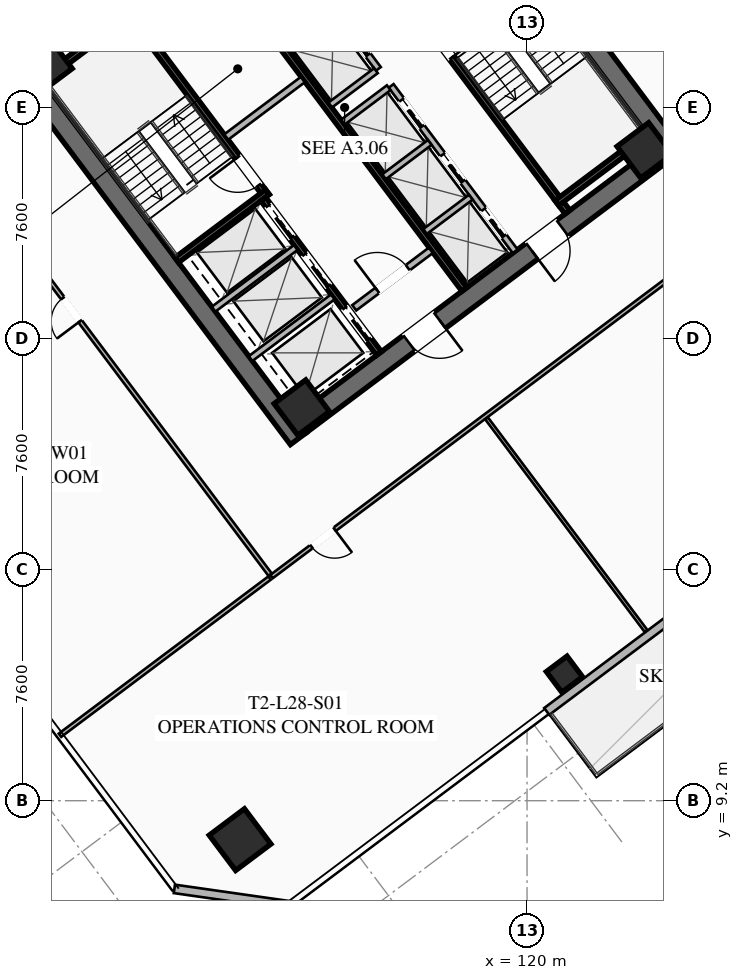
"""IFC4 building model, lengths in metres.
Left out: names, types, materials, properties, quantities, classifications, styles, units other than length and angle.
Written with IfcOpenShell. Run it as: python <this file> out.ifc"""

import sys

from ifc_helpers import new_model, si_unit, direction, frame, frame_2d, origin, origin_2d, place, context, subcontext, project, spatial, rectangle, hollow_rectangle, extrude, element, fill, save


model = new_model("IFC4")
c1 = context("Model", 3, precision=1e-05, world=origin(), true_north=direction((0.0, 1.0)))
c2 = subcontext(c1, "Body", "Model", "MODEL_VIEW")
j1 = project(units=[si_unit("LENGTHUNIT", "METRE"), si_unit("PLANEANGLEUNIT", "RADIAN")], contexts=[c1])
p1 = place(None, origin())
s1 = spatial("IfcSite", under=j1, at=p1, CompositionType="ELEMENT")
p2 = place(p1, origin())
s2 = spatial("IfcBuilding", under=s1, at=p2, CompositionType="ELEMENT")
p3 = place(p2, frame((0.0, 0.0, 106.25)))
s3 = spatial("IfcBuildingStorey", under=s2, at=p3, CompositionType="ELEMENT", Elevation=106.25)
for number, where, z_axis, x_axis in (
    (1, (112.476, 21.107, 0.0), (0.0, 0.0, 1.0), (-0.6, 0.8, 0.0)),
    (2, (115.524, 42.893, 0.0), (0.0, 0.0, 1.0), (0.6, -0.8, 0.0)),
):
    element("IfcWall", number, at=place(p3, frame(where, z_axis=z_axis, x_axis=x_axis)), inside=s3, PredefinedType="SHEAR", context=c2, shape_type="SweptSolid", body=[
        extrude(rectangle(XDim=15.6, YDim=0.65, at=frame_2d((7.8, 0.0))), origin(), (0.0, 0.0, 1.0), 3.55),
    ])
p4 = place(p3, frame((124.429, 30.478, 0.0), z_axis=(0.0, 0.0, 1.0), x_axis=(-0.799998028465, -0.600002628705, 0.0)))
e3 = element("IfcWall", 3, at=p4, inside=s3, PredefinedType="SHEAR", context=c2, shape_type="SweptSolid", body=[
    extrude(rectangle(XDim=14.86, YDim=0.65, at=frame_2d((7.43, 0.0))), origin(), (0.0, 0.0, 1.0), 3.55),
])
p5 = place(p4, frame((9.13, 0.0, 0.0)))
e4 = element("IfcOpeningElement", 4, at=p5, cuts=e3, PredefinedType="OPENING", context=c2, shape_type="SweptSolid", body=[
    extrude(rectangle(XDim=1.25, YDim=2.25, at=frame_2d((0.625, 1.125))), frame((0.0, 0.335, 0.0), z_axis=(0.0, -1.0, 0.0), x_axis=(1.0, 0.0, 0.0)), (0.0, 0.0, 1.0), 0.67),
])
p6 = place(p4, frame((4.08, 0.0, 0.0)))
e5 = element("IfcOpeningElement", 5, at=p6, cuts=e3, PredefinedType="OPENING", context=c2, shape_type="SweptSolid", body=[
    extrude(rectangle(XDim=1.25, YDim=2.25, at=frame_2d((0.625, 1.125))), frame((0.0, 0.335, 0.0), z_axis=(0.0, -1.0, 0.0), x_axis=(1.0, 0.0, 0.0)), (0.0, 0.0, 1.0), 0.67),
])
p7 = place(p3, frame((103.571, 33.522, 0.0), z_axis=(0.0, 0.0, 1.0), x_axis=(0.799998028465, 0.600002628705, 0.0)))
e6 = element("IfcWall", 6, at=p7, inside=s3, PredefinedType="SHEAR", context=c2, shape_type="SweptSolid", body=[
    extrude(rectangle(XDim=14.86, YDim=0.65, at=frame_2d((7.43, 0.0))), origin(), (0.0, 0.0, 1.0), 3.55),
])
p8 = place(p7, frame((4.48, 0.0, 0.0)))
e7 = element("IfcOpeningElement", 7, at=p8, cuts=e6, PredefinedType="OPENING", context=c2, shape_type="SweptSolid", body=[
    extrude(rectangle(XDim=1.25, YDim=2.25, at=frame_2d((0.625, 1.125))), frame((0.0, 0.335, 0.0), z_axis=(0.0, -1.0, 0.0), x_axis=(1.0, 0.0, 0.0)), (0.0, 0.0, 1.0), 0.67),
])
p9 = place(p7, frame((9.53, 0.0, 0.0)))
e8 = element("IfcOpeningElement", 8, at=p9, cuts=e6, PredefinedType="OPENING", context=c2, shape_type="SweptSolid", body=[
    extrude(rectangle(XDim=1.25, YDim=2.25, at=frame_2d((0.625, 1.125))), frame((0.0, 0.335, 0.0), z_axis=(0.0, -1.0, 0.0), x_axis=(1.0, 0.0, 0.0)), (0.0, 0.0, 1.0), 0.67),
])
for number, where, z_axis, x_axis in (
    (9, (112.59, 22.13, 0.0), (0.0, 0.0, 1.0), (0.8, 0.6, 0.0)),
    (10, (123.87, 30.59, 0.0), (0.0, 0.0, 1.0), (0.8, 0.6, 0.0)),
    (11, (104.13, 33.41, 0.0), (0.0, 0.0, 1.0), (0.8, 0.6, 0.0)),
):
    element("IfcColumn", number, at=place(p3, frame(where, z_axis=z_axis, x_axis=x_axis)), inside=s3, PredefinedType="COLUMN", context=c2, shape_type="SweptSolid", body=[
        extrude(hollow_rectangle(XDim=1.3, YDim=1.3, WallThickness=0.05, at=origin_2d()), origin(), (0.0, 0.0, 1.0), 3.25),
    ])
p10 = place(p3, frame((110.56, 7.92, 0.0), z_axis=(0.0, 0.0, 1.0), x_axis=(0.799999996291, 0.600000004945, 0.0)))
e12 = element("IfcColumn", 12, at=p10, inside=s3, PredefinedType="COLUMN", context=c2, shape_type="SweptSolid", body=[
    extrude(hollow_rectangle(XDim=1.45, YDim=1.45, WallThickness=0.055, at=origin_2d()), origin(), (0.0, 0.0, 1.0), 3.25),
])
p11 = place(p3, frame((121.23, 13.36, 0.0), z_axis=(0.0, 0.0, 1.0), x_axis=(0.799999996291, 0.600000004945, 0.0)))
e13 = element("IfcColumn", 13, at=p11, inside=s3, PredefinedType="COLUMN", context=c2, shape_type="SweptSolid", body=[
    extrude(hollow_rectangle(XDim=0.85, YDim=0.85, WallThickness=0.035, at=origin_2d()), origin(), (0.0, 0.0, 1.0), 3.25),
])
p12 = place(p3, frame((131.208, 20.056, 0.0), z_axis=(0.0, 0.0, 1.0), x_axis=(-0.800004438899, -0.599994081423, 0.0)))
e14 = element("IfcWall", 14, at=p12, inside=s3, PredefinedType="SOLIDWALL", context=c2, shape_type="SweptSolid", body=[
    extrude(rectangle(XDim=13.2, YDim=0.28, at=frame_2d((6.6, 0.0))), origin(), (0.0, 0.0, 1.0), 3.25),
])
p13 = place(p12, frame((2.2, 0.0, 0.0)))
e15 = element("IfcOpeningElement", 15, at=p13, cuts=e14, PredefinedType="OPENING", context=c2, shape_type="SweptSolid", body=[
    extrude(rectangle(XDim=1.3, YDim=2.15, at=frame_2d((0.65, 1.075))), frame((0.0, 0.15, 0.0), z_axis=(0.0, -1.0, 0.0), x_axis=(1.0, 0.0, 0.0)), (0.0, 0.0, 1.0), 0.3),
])
p14 = place(p3, frame((112.18, 5.76, 0.0), z_axis=(0.0, 0.0, 1.0), x_axis=(-0.989948214866, 0.141430307517, 0.0)))
e16 = element("IfcWall", 16, at=p14, inside=s3, PredefinedType="SOLIDWALL", context=c2, shape_type="SweptSolid", body=[
    extrude(rectangle(XDim=3.818, YDim=0.28, at=frame_2d((1.909, 0.0))), origin(), (0.0, 0.0, 1.0), 3.25),
])
p15 = place(p3, frame((111.44, 29.08, 0.0), z_axis=(0.0, 0.0, 1.0), x_axis=(-0.600009827119, 0.799992629566, 0.0)))
e17 = element("IfcWall", 17, at=p15, inside=s3, PredefinedType="SHEAR", context=c2, shape_type="SweptSolid", body=[
    extrude(rectangle(XDim=7.95, YDim=0.2, at=frame_2d((3.975, 0.0))), origin(), (0.0, 0.0, 1.0), 3.25),
])
p16 = place(p15, frame((0.45, 0.0, 0.0)))
e18 = element("IfcOpeningElement", 18, at=p16, cuts=e17, PredefinedType="OPENING", context=c2, shape_type="SweptSolid", body=[
    extrude(rectangle(XDim=1.15, YDim=2.2, at=frame_2d((0.575, 1.1))), frame((0.0, 0.11, 0.0), z_axis=(0.0, -1.0, 0.0), x_axis=(1.0, 0.0, 0.0)), (0.0, 0.0, 1.0), 0.22),
])
for number, where, z_axis, x_axis in (
    (19, (108.476, 26.982, 0.0), (0.0, 0.0, 1.0), (0.8, 0.6, 0.0)),
    (20, (104.036, 32.902, 0.0), (0.0, 0.0, 1.0), (0.8, 0.6, 0.0)),
):
    element("IfcWall", number, at=place(p3, frame(where, z_axis=z_axis, x_axis=x_axis)), inside=s3, PredefinedType="SHEAR", context=c2, shape_type="SweptSolid", body=[
        extrude(rectangle(XDim=3.73, YDim=0.2, at=frame_2d((1.865, 0.0))), origin(), (0.0, 0.0, 1.0), 3.25),
    ])
p17 = place(p3, frame((116.56, 34.92, 0.0), z_axis=(0.0, 0.0, 1.0), x_axis=(0.600009827119, -0.799992629566, 0.0)))
e21 = element("IfcWall", 21, at=p17, inside=s3, PredefinedType="SHEAR", context=c2, shape_type="SweptSolid", body=[
    extrude(rectangle(XDim=7.95, YDim=0.2, at=frame_2d((3.975, 0.0))), origin(), (0.0, 0.0, 1.0), 3.25),
])
p18 = place(p17, frame((0.45, 0.0, 0.0)))
e22 = element("IfcOpeningElement", 22, at=p18, cuts=e21, PredefinedType="OPENING", context=c2, shape_type="SweptSolid", body=[
    extrude(rectangle(XDim=1.15, YDim=2.2, at=frame_2d((0.575, 1.1))), frame((0.0, 0.11, 0.0), z_axis=(0.0, -1.0, 0.0), x_axis=(1.0, 0.0, 0.0)), (0.0, 0.0, 1.0), 0.22),
])
p19 = place(p3, frame((120.98, 28.86, 0.0), z_axis=(0.0, 0.0, 1.0), x_axis=(0.800039270442, 0.59994763584, 0.0)))
e23 = element("IfcWall", 23, at=p19, inside=s3, PredefinedType="SHEAR", context=c2, shape_type="SweptSolid", body=[
    extrude(rectangle(XDim=3.73, YDim=0.2, at=frame_2d((1.865, 0.0))), origin(), (0.0, 0.0, 1.0), 3.25),
])
p20 = place(p3, frame((117.938, 26.016, 0.0), z_axis=(0.0, 0.0, 1.0), x_axis=(-0.600005463273, 0.799995902516, 0.0)))
e24 = element("IfcWall", 24, at=p20, inside=s3, PredefinedType="SHEAR", context=c2, shape_type="SweptSolid", body=[
    extrude(rectangle(XDim=14.3, YDim=0.2, at=frame_2d((7.15, 0.0))), origin(), (0.0, 0.0, 1.0), 3.25),
])
p21 = place(p3, frame((110.104, 31.028, 0.0), z_axis=(0.0, 0.0, 1.0), x_axis=(0.800018601094, 0.59997519774, 0.0)))
e25 = element("IfcWall", 25, at=p21, inside=s3, PredefinedType="SOLIDWALL", context=c2, shape_type="SweptSolid", body=[
    extrude(rectangle(XDim=3.15, YDim=0.22, at=frame_2d((1.575, 0.0))), origin(), (0.0, 0.0, 1.0), 2.393),
])
p22 = place(p3, frame((114.316, 25.412, 0.0), z_axis=(0.0, 0.0, 1.0), x_axis=(0.800018601094, 0.59997519774, 0.0)))
e26 = element("IfcWall", 26, at=p22, inside=s3, PredefinedType="SOLIDWALL", context=c2, shape_type="SweptSolid", body=[
    extrude(rectangle(XDim=3.15, YDim=0.22, at=frame_2d((1.575, 0.0))), origin(), (0.0, 0.0, 1.0), 2.393),
])
p23 = place(p22, frame((0.95, 0.0, 0.0)))
e27 = element("IfcOpeningElement", 27, at=p23, cuts=e26, PredefinedType="OPENING", context=c2, shape_type="SweptSolid", body=[
    extrude(rectangle(XDim=1.25, YDim=2.25, at=frame_2d((0.625, 1.125))), frame((0.0, 0.12, 0.0), z_axis=(0.0, -1.0, 0.0), x_axis=(1.0, 0.0, 0.0)), (0.0, 0.0, 1.0), 0.24),
])
p24 = place(p3, frame((115.13, 23.91, 0.0), z_axis=(0.0, 0.0, 1.0), x_axis=(-0.599975393228, 0.800018454488, 0.0)))
e28 = element("IfcWall", 28, at=p24, inside=s3, PredefinedType="SHEAR", context=c2, shape_type="SweptSolid", body=[
    extrude(rectangle(XDim=6.35, YDim=0.2, at=frame_2d((3.175, 0.0))), origin(), (0.0, 0.0, 1.0), 3.25),
])
p25 = place(p24, frame((4.775, 0.0, 0.0)))
e29 = element("IfcOpeningElement", 29, at=p25, cuts=e28, PredefinedType="OPENING", context=c2, shape_type="SweptSolid", body=[
    extrude(rectangle(XDim=1.3, YDim=2.25, at=frame_2d((0.65, 1.125))), frame((0.0, 0.11, 0.0), z_axis=(0.0, -1.0, 0.0), x_axis=(1.0, 0.0, 0.0)), (0.0, 0.0, 1.0), 0.22),
])
p26 = place(p24, frame((2.775, 0.0, 0.0)))
e30 = element("IfcOpeningElement", 30, at=p26, cuts=e28, PredefinedType="OPENING", context=c2, shape_type="SweptSolid", body=[
    extrude(rectangle(XDim=1.3, YDim=2.25, at=frame_2d((0.65, 1.125))), frame((0.0, 0.11, 0.0), z_axis=(0.0, -1.0, 0.0), x_axis=(1.0, 0.0, 0.0)), (0.0, 0.0, 1.0), 0.22),
])
p27 = place(p24, frame((0.575, 0.0, 0.0)))
e31 = element("IfcOpeningElement", 31, at=p27, cuts=e28, PredefinedType="OPENING", context=c2, shape_type="SweptSolid", body=[
    extrude(rectangle(XDim=1.3, YDim=2.25, at=frame_2d((0.65, 1.125))), frame((0.0, 0.11, 0.0), z_axis=(0.0, -1.0, 0.0), x_axis=(1.0, 0.0, 0.0)), (0.0, 0.0, 1.0), 0.22),
])
for number, where, z_axis, x_axis in (
    (32, (110.906, 23.742, 0.0), (0.0, 0.0, 1.0), (0.8, 0.6, 0.0)),
    (33, (109.688, 25.366, 0.0), (0.0, 0.0, 1.0), (0.8, 0.6, 0.0)),
):
    element("IfcWall", number, at=place(p3, frame(where, z_axis=z_axis, x_axis=x_axis)), inside=s3, PredefinedType="SOLIDWALL", context=c2, shape_type="SweptSolid", body=[
        extrude(rectangle(XDim=3.38, YDim=0.2, at=frame_2d((1.69, 0.0))), origin(), (0.0, 0.0, 1.0), 3.25),
    ])
p28 = place(p3, frame((119.61, 27.27, 0.0), z_axis=(0.0, 0.0, 1.0), x_axis=(-0.600011488909, 0.79999138319, 0.0)))
e34 = element("IfcWall", 34, at=p28, inside=s3, PredefinedType="SOLIDWALL", context=c2, shape_type="SweptSolid", body=[
    extrude(rectangle(XDim=6.8, YDim=0.2, at=frame_2d((3.4, 0.0))), origin(), (0.0, 0.0, 1.0), 3.25),
])
p29 = place(p28, frame((0.625, 0.0, 0.0)))
e35 = element("IfcOpeningElement", 35, at=p29, cuts=e34, PredefinedType="OPENING", context=c2, shape_type="SweptSolid", body=[
    extrude(rectangle(XDim=1.1, YDim=2.2, at=frame_2d((0.55, 1.1))), frame((0.0, 0.11, 0.0), z_axis=(0.0, -1.0, 0.0), x_axis=(1.0, 0.0, 0.0)), (0.0, 0.0, 1.0), 0.22),
])
p30 = place(p28, frame((2.875, 0.0, 0.0)))
e36 = element("IfcOpeningElement", 36, at=p30, cuts=e34, PredefinedType="OPENING", context=c2, shape_type="SweptSolid", body=[
    extrude(rectangle(XDim=1.1, YDim=2.2, at=frame_2d((0.55, 1.1))), frame((0.0, 0.11, 0.0), z_axis=(0.0, -1.0, 0.0), x_axis=(1.0, 0.0, 0.0)), (0.0, 0.0, 1.0), 0.22),
])
p31 = place(p28, frame((5.125, 0.0, 0.0)))
e37 = element("IfcOpeningElement", 37, at=p31, cuts=e34, PredefinedType="OPENING", context=c2, shape_type="SweptSolid", body=[
    extrude(rectangle(XDim=1.1, YDim=2.2, at=frame_2d((0.55, 1.1))), frame((0.0, 0.11, 0.0), z_axis=(0.0, -1.0, 0.0), x_axis=(1.0, 0.0, 0.0)), (0.0, 0.0, 1.0), 0.22),
])
p32 = place(p3, frame((116.646, 27.922, 0.0), z_axis=(0.0, 0.0, 1.0), x_axis=(0.8, 0.6, 0.0)))
e38 = element("IfcWall", 38, at=p32, inside=s3, PredefinedType="SOLIDWALL", context=c2, shape_type="SweptSolid", body=[
    extrude(rectangle(XDim=1.88, YDim=0.2, at=frame_2d((0.94, 0.0))), origin(), (0.0, 0.0, 1.0), 3.25),
])
p33 = place(p3, frame((115.296, 29.722, 0.0), z_axis=(0.0, 0.0, 1.0), x_axis=(0.799984418148, 0.600020775241, 0.0)))
e39 = element("IfcWall", 39, at=p33, inside=s3, PredefinedType="SOLIDWALL", context=c2, shape_type="SweptSolid", body=[
    extrude(rectangle(XDim=1.88, YDim=0.2, at=frame_2d((0.94, 0.0))), origin(), (0.0, 0.0, 1.0), 3.25),
])
p34 = place(p3, frame((113.946, 31.522, 0.0), z_axis=(0.0, 0.0, 1.0), x_axis=(0.8, 0.6, 0.0)))
e40 = element("IfcWall", 40, at=p34, inside=s3, PredefinedType="SOLIDWALL", context=c2, shape_type="SweptSolid", body=[
    extrude(rectangle(XDim=1.88, YDim=0.2, at=frame_2d((0.94, 0.0))), origin(), (0.0, 0.0, 1.0), 3.25),
])
p35 = place(p3, frame((115.11, 33.27, 0.0), z_axis=(0.0, 0.0, 1.0), x_axis=(-0.600011488909, 0.79999138319, 0.0)))
e41 = element("IfcWall", 41, at=p35, inside=s3, PredefinedType="SOLIDWALL", context=c2, shape_type="SweptSolid", body=[
    extrude(rectangle(XDim=6.8, YDim=0.2, at=frame_2d((3.4, 0.0))), origin(), (0.0, 0.0, 1.0), 3.25),
])
p36 = place(p35, frame((0.575, 0.0, 0.0)))
e42 = element("IfcOpeningElement", 42, at=p36, cuts=e41, PredefinedType="OPENING", context=c2, shape_type="SweptSolid", body=[
    extrude(rectangle(XDim=1.1, YDim=2.2, at=frame_2d((0.55, 1.1))), frame((0.0, 0.11, 0.0), z_axis=(0.0, -1.0, 0.0), x_axis=(1.0, 0.0, 0.0)), (0.0, 0.0, 1.0), 0.22),
])
p37 = place(p35, frame((2.825, 0.0, 0.0)))
e43 = element("IfcOpeningElement", 43, at=p37, cuts=e41, PredefinedType="OPENING", context=c2, shape_type="SweptSolid", body=[
    extrude(rectangle(XDim=1.1, YDim=2.2, at=frame_2d((0.55, 1.1))), frame((0.0, 0.11, 0.0), z_axis=(0.0, -1.0, 0.0), x_axis=(1.0, 0.0, 0.0)), (0.0, 0.0, 1.0), 0.22),
])
p38 = place(p35, frame((5.075, 0.0, 0.0)))
e44 = element("IfcOpeningElement", 44, at=p38, cuts=e41, PredefinedType="OPENING", context=c2, shape_type="SweptSolid", body=[
    extrude(rectangle(XDim=1.1, YDim=2.2, at=frame_2d((0.55, 1.1))), frame((0.0, 0.11, 0.0), z_axis=(0.0, -1.0, 0.0), x_axis=(1.0, 0.0, 0.0)), (0.0, 0.0, 1.0), 0.22),
])
p39 = place(p3, frame((113.526, 32.082, 0.0), z_axis=(0.0, 0.0, 1.0), x_axis=(0.800046745961, 0.599937666993, 0.0)))
e45 = element("IfcWall", 45, at=p39, inside=s3, PredefinedType="SOLIDWALL", context=c2, shape_type="SweptSolid", body=[
    extrude(rectangle(XDim=1.88, YDim=0.2, at=frame_2d((0.94, 0.0))), origin(), (0.0, 0.0, 1.0), 3.25),
])
p40 = place(p3, frame((112.176, 33.882, 0.0), z_axis=(0.0, 0.0, 1.0), x_axis=(0.8, 0.6, 0.0)))
e46 = element("IfcWall", 46, at=p40, inside=s3, PredefinedType="SOLIDWALL", context=c2, shape_type="SweptSolid", body=[
    extrude(rectangle(XDim=1.88, YDim=0.2, at=frame_2d((0.94, 0.0))), origin(), (0.0, 0.0, 1.0), 3.25),
])
p41 = place(p3, frame((134.18, 33.51, 0.0), z_axis=(0.0, 0.0, 1.0), x_axis=(-0.8, -0.6, 0.0)))
e47 = element("IfcWall", 47, at=p41, inside=s3, PredefinedType="PARTITIONING", context=c2, shape_type="SweptSolid", body=[
    extrude(rectangle(XDim=28.23, YDim=0.135, at=frame_2d((14.115, 0.0))), origin(), (0.0, 0.0, 1.0), 2.393),
])
p42 = place(p41, frame((25.637, 0.0, 0.0)))
e48 = element("IfcOpeningElement", 48, at=p42, cuts=e47, PredefinedType="OPENING", context=c2, shape_type="SweptSolid", body=[
    extrude(rectangle(XDim=0.95, YDim=2.05, at=frame_2d((0.475, 1.025))), frame((0.0, 0.077, 0.0), z_axis=(0.0, -1.0, 0.0), x_axis=(1.0, 0.0, 0.0)), (0.0, 0.0, 1.0), 0.155),
])
p43 = place(p41, frame((0.38, 0.0, 0.0)))
e49 = element("IfcOpeningElement", 49, at=p43, cuts=e47, PredefinedType="OPENING", context=c2, shape_type="SweptSolid", body=[
    extrude(rectangle(XDim=0.95, YDim=2.05, at=frame_2d((0.475, 1.025))), frame((0.0, 0.077, 0.0), z_axis=(0.0, -1.0, 0.0), x_axis=(1.0, 0.0, 0.0)), (0.0, 0.0, 1.0), 0.155),
])
p44 = place(p3, frame((123.918, 14.776, 0.0), z_axis=(0.0, 0.0, 1.0), x_axis=(-0.6, 0.8, 0.0)))
e50 = element("IfcWall", 50, at=p44, inside=s3, PredefinedType="PARTITIONING", context=c2, shape_type="SweptSolid", body=[
    extrude(rectangle(XDim=8.75, YDim=0.11, at=frame_2d((4.375, 0.0))), origin(), (0.0, 0.0, 1.0), 2.393),
])
p45 = place(p3, frame((111.548, 16.636, 0.0), z_axis=(0.0, 0.0, 1.0), x_axis=(-0.600001772333, 0.799998670747, 0.0)))
e51 = element("IfcWall", 51, at=p45, inside=s3, PredefinedType="PARTITIONING", context=c2, shape_type="SweptSolid", body=[
    extrude(rectangle(XDim=22.04, YDim=0.135, at=frame_2d((11.02, 0.0))), origin(), (0.0, 0.0, 1.0), 2.393),
])
p46 = place(p45, frame((10.418, 0.0, 0.0)))
e52 = element("IfcOpeningElement", 52, at=p46, cuts=e51, PredefinedType="OPENING", context=c2, shape_type="SweptSolid", body=[
    extrude(rectangle(XDim=0.95, YDim=2.05, at=frame_2d((0.475, 1.025))), frame((0.0, 0.077, 0.0), z_axis=(0.0, -1.0, 0.0), x_axis=(1.0, 0.0, 0.0)), (0.0, 0.0, 1.0), 0.155),
])
p47 = place(p3, frame((104.636, 11.352, 0.0), z_axis=(0.0, 0.0, 1.0), x_axis=(0.800006797429, 0.599990936654, 0.0)))
e53 = element("IfcWall", 53, at=p47, inside=s3, PredefinedType="PARTITIONING", context=c2, shape_type="SweptSolid", body=[
    extrude(rectangle(XDim=8.62, YDim=0.135, at=frame_2d((4.31, 0.0))), origin(), (0.0, 0.0, 1.0), 2.393),
])
p48 = place(p5, origin())
e54 = element("IfcDoor", 54, at=p48, inside=s3, OperationType="SINGLE_SWING_LEFT", PredefinedType="DOOR", context=c2, shape_type="SweptSolid", body=[
    extrude(rectangle(XDim=1.25, YDim=2.25, at=frame_2d((0.625, 1.125))), frame((0.0, 0.025, 0.0), z_axis=(0.0, -1.0, 0.0), x_axis=(1.0, 0.0, 0.0)), (0.0, 0.0, 1.0), 0.05),
])
fill(e4, e54)
p49 = place(p6, origin())
e55 = element("IfcDoor", 55, at=p49, inside=s3, OperationType="SINGLE_SWING_RIGHT", PredefinedType="DOOR", context=c2, shape_type="SweptSolid", body=[
    extrude(rectangle(XDim=1.25, YDim=2.25, at=frame_2d((0.625, 1.125))), frame((0.0, 0.025, 0.0), z_axis=(0.0, -1.0, 0.0), x_axis=(1.0, 0.0, 0.0)), (0.0, 0.0, 1.0), 0.05),
])
fill(e5, e55)
p50 = place(p16, origin())
e56 = element("IfcDoor", 56, at=p50, inside=s3, OperationType="SINGLE_SWING_RIGHT", PredefinedType="DOOR", context=c2, shape_type="SweptSolid", body=[
    extrude(rectangle(XDim=1.15, YDim=2.2, at=frame_2d((0.575, 1.1))), frame((0.0, 0.025, 0.0), z_axis=(0.0, -1.0, 0.0), x_axis=(1.0, 0.0, 0.0)), (0.0, 0.0, 1.0), 0.05),
])
fill(e18, e56)
p51 = place(p18, origin())
e57 = element("IfcDoor", 57, at=p51, inside=s3, OperationType="SINGLE_SWING_RIGHT", PredefinedType="DOOR", context=c2, shape_type="SweptSolid", body=[
    extrude(rectangle(XDim=1.15, YDim=2.2, at=frame_2d((0.575, 1.1))), frame((0.0, 0.025, 0.0), z_axis=(0.0, -1.0, 0.0), x_axis=(1.0, 0.0, 0.0)), (0.0, 0.0, 1.0), 0.05),
])
fill(e22, e57)
p52 = place(p23, origin())
e58 = element("IfcDoor", 58, at=p52, inside=s3, OperationType="SINGLE_SWING_LEFT", PredefinedType="DOOR", context=c2, shape_type="SweptSolid", body=[
    extrude(rectangle(XDim=1.25, YDim=2.25, at=frame_2d((0.625, 1.125))), frame((0.0, 0.025, 0.0), z_axis=(0.0, -1.0, 0.0), x_axis=(1.0, 0.0, 0.0)), (0.0, 0.0, 1.0), 0.05),
])
fill(e27, e58)
p53 = place(p42, origin())
e59 = element("IfcDoor", 59, at=p53, inside=s3, OperationType="SINGLE_SWING_LEFT", PredefinedType="DOOR", context=c2, shape_type="SweptSolid", body=[
    extrude(rectangle(XDim=0.95, YDim=2.05, at=frame_2d((0.475, 1.025))), frame((0.0, 0.025, 0.0), z_axis=(0.0, -1.0, 0.0), x_axis=(1.0, 0.0, 0.0)), (0.0, 0.0, 1.0), 0.05),
])
fill(e48, e59)
p54 = place(p46, origin())
e60 = element("IfcDoor", 60, at=p54, inside=s3, OperationType="SINGLE_SWING_LEFT", PredefinedType="DOOR", context=c2, shape_type="SweptSolid", body=[
    extrude(rectangle(XDim=0.95, YDim=2.05, at=frame_2d((0.475, 1.025))), frame((0.0, 0.025, 0.0), z_axis=(0.0, -1.0, 0.0), x_axis=(1.0, 0.0, 0.0)), (0.0, 0.0, 1.0), 0.05),
])
fill(e52, e60)
p55 = place(p25, origin())
e61 = element("IfcDoor", 61, at=p55, inside=s3, OperationType="SLIDING_TO_LEFT", PredefinedType="DOOR", context=c2, shape_type="SweptSolid", body=[
    extrude(rectangle(XDim=1.3, YDim=2.25, at=frame_2d((0.65, 1.125))), frame((0.0, 0.025, 0.0), z_axis=(0.0, -1.0, 0.0), x_axis=(1.0, 0.0, 0.0)), (0.0, 0.0, 1.0), 0.05),
])
fill(e29, e61)
p56 = place(p26, origin())
e62 = element("IfcDoor", 62, at=p56, inside=s3, OperationType="SLIDING_TO_LEFT", PredefinedType="DOOR", context=c2, shape_type="SweptSolid", body=[
    extrude(rectangle(XDim=1.3, YDim=2.25, at=frame_2d((0.65, 1.125))), frame((0.0, 0.025, 0.0), z_axis=(0.0, -1.0, 0.0), x_axis=(1.0, 0.0, 0.0)), (0.0, 0.0, 1.0), 0.05),
])
fill(e30, e62)
p57 = place(p27, origin())
e63 = element("IfcDoor", 63, at=p57, inside=s3, OperationType="SLIDING_TO_LEFT", PredefinedType="DOOR", context=c2, shape_type="SweptSolid", body=[
    extrude(rectangle(XDim=1.3, YDim=2.25, at=frame_2d((0.65, 1.125))), frame((0.0, 0.025, 0.0), z_axis=(0.0, -1.0, 0.0), x_axis=(1.0, 0.0, 0.0)), (0.0, 0.0, 1.0), 0.05),
])
fill(e31, e63)
p58 = place(p29, origin())
e64 = element("IfcDoor", 64, at=p58, inside=s3, OperationType="SLIDING_TO_LEFT", PredefinedType="DOOR", context=c2, shape_type="SweptSolid", body=[
    extrude(rectangle(XDim=1.1, YDim=2.2, at=frame_2d((0.55, 1.1))), frame((0.0, 0.025, 0.0), z_axis=(0.0, -1.0, 0.0), x_axis=(1.0, 0.0, 0.0)), (0.0, 0.0, 1.0), 0.05),
])
fill(e35, e64)
p59 = place(p30, origin())
e65 = element("IfcDoor", 65, at=p59, inside=s3, OperationType="SLIDING_TO_LEFT", PredefinedType="DOOR", context=c2, shape_type="SweptSolid", body=[
    extrude(rectangle(XDim=1.1, YDim=2.2, at=frame_2d((0.55, 1.1))), frame((0.0, 0.025, 0.0), z_axis=(0.0, -1.0, 0.0), x_axis=(1.0, 0.0, 0.0)), (0.0, 0.0, 1.0), 0.05),
])
fill(e36, e65)
p60 = place(p31, origin())
e66 = element("IfcDoor", 66, at=p60, inside=s3, OperationType="SLIDING_TO_LEFT", PredefinedType="DOOR", context=c2, shape_type="SweptSolid", body=[
    extrude(rectangle(XDim=1.1, YDim=2.2, at=frame_2d((0.55, 1.1))), frame((0.0, 0.025, 0.0), z_axis=(0.0, -1.0, 0.0), x_axis=(1.0, 0.0, 0.0)), (0.0, 0.0, 1.0), 0.05),
])
fill(e37, e66)
p61 = place(p36, origin())
e67 = element("IfcDoor", 67, at=p61, inside=s3, OperationType="SLIDING_TO_LEFT", PredefinedType="DOOR", context=c2, shape_type="SweptSolid", body=[
    extrude(rectangle(XDim=1.1, YDim=2.2, at=frame_2d((0.55, 1.1))), frame((0.0, 0.025, 0.0), z_axis=(0.0, -1.0, 0.0), x_axis=(1.0, 0.0, 0.0)), (0.0, 0.0, 1.0), 0.05),
])
fill(e42, e67)
save(model, sys.argv[1])
